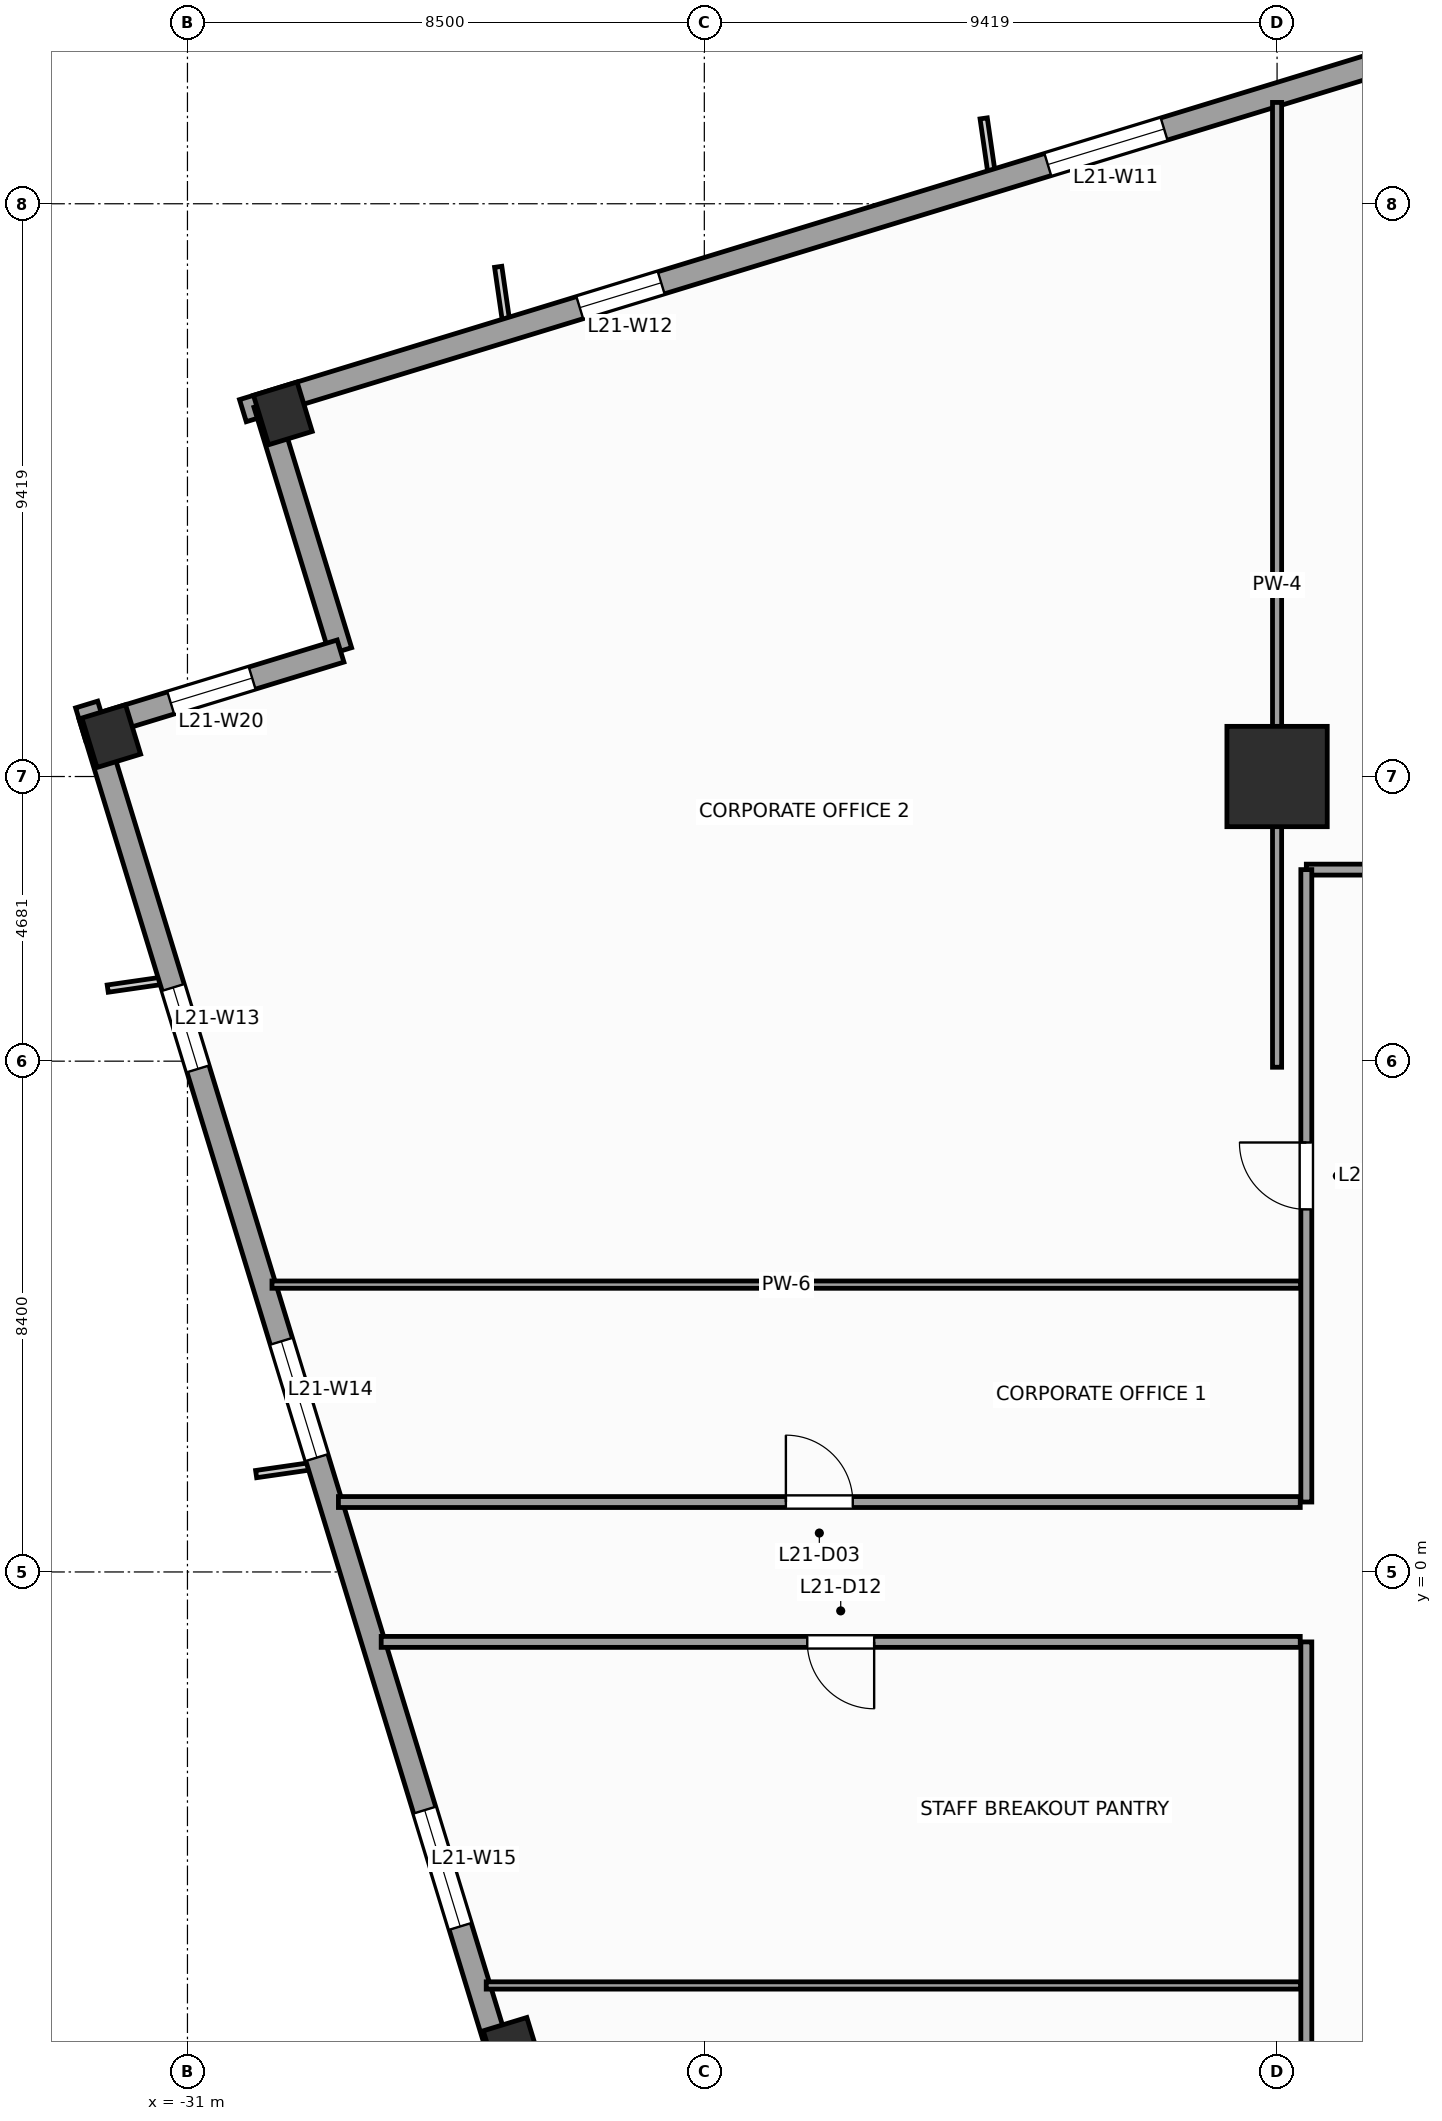
"""IFC4 building model, lengths in metres.
Left out: names, types, materials, properties, quantities, classifications, styles, units other than length and angle.
Written with IfcOpenShell. Run it as: python <this file> out.ifc"""

import sys

from ifc_helpers import new_model, si_unit, direction, frame, frame_2d, origin, origin_2d, place, context, subcontext, project, spatial, rectangle, extrude, source, transform, mapped, element, fill, save


model = new_model("IFC4")
c1 = context("Model", 3, precision=1e-05, world=origin(), true_north=direction((0.0, 1.0)))
c2 = subcontext(c1, "Body", "Model", "MODEL_VIEW")
j1 = project(units=[si_unit("LENGTHUNIT", "METRE"), si_unit("PLANEANGLEUNIT", "RADIAN")], contexts=[c1])
p1 = place(None, origin())
s1 = spatial("IfcSite", under=j1, at=p1, CompositionType="ELEMENT")
p2 = place(p1, origin())
s2 = spatial("IfcBuilding", under=s1, at=p2, CompositionType="ELEMENT")
p3 = place(p2, frame((0.0, 0.0, 91.2)))
s3 = spatial("IfcBuildingStorey", under=s2, at=p3, CompositionType="ELEMENT", Elevation=91.2)
m1 = source(origin(), c2, "Body", "SweptSolid", [
    extrude(rectangle(XDim=1.65, YDim=1.65, at=origin_2d()), origin(), (0.0, 0.0, 1.0), 4.0),
])
p4 = place(p3, frame((-13.081, 13.081, 0.0), z_axis=(0.0, 0.0, 1.0), x_axis=(1.0, 0.0, 0.0)))
e1 = element("IfcColumn", 1, at=p4, inside=s3, PredefinedType="COLUMN", context=c2, shape_type="MappedRepresentation", body=[
    mapped(m1, transform((0.0, 0.0, 0.0), scale=1.0)),
])
m2 = source(origin(), c2, "Body", "SweptSolid", [
    extrude(rectangle(XDim=0.75, YDim=0.85, at=origin_2d()), origin(), (0.0, 0.0, 1.0), 4.0),
])
for number, where, z_axis, x_axis in (
    (2, (-29.431, 19.052, 0.0), (0.0, 0.0, 1.0), (0.956, 0.292, 0.0)),
    (3, (-32.253, 13.746, 0.0), (0.0, 0.0, 1.0), (0.956, 0.292, 0.0)),
    (4, (-25.653, -7.843, 0.0), (0.0, 0.0, 1.0), (0.956, 0.292, 0.0)),
):
    element("IfcColumn", number, at=place(p3, frame(where, z_axis=z_axis, x_axis=x_axis)), inside=s3, PredefinedType="COLUMN", context=c2, shape_type="MappedRepresentation", body=[
        mapped(m2, transform((0.0, 0.0, 0.0), scale=1.0)),
    ])
p5 = place(p3, frame((14.265, 32.658, 0.0), z_axis=(0.0, 0.0, 1.0), x_axis=(-0.956304320851, -0.292373127906, 0.0)))
e5 = element("IfcWall", 5, at=p5, inside=s3, PredefinedType="STANDARD", context=c2, shape_type="SweptSolid", body=[
    extrude(rectangle(XDim=46.38, YDim=0.38, at=frame_2d((23.19, 0.0))), origin(), (0.0, 0.0, 1.0), 3.14),
])
p6 = place(p5, frame((17.065, 0.0, 0.0)))
e6 = element("IfcOpeningElement", 6, at=p6, cuts=e5, PredefinedType="OPENING", context=c2, shape_type="SweptSolid", body=[
    extrude(rectangle(XDim=1.05, YDim=2.25, at=frame_2d((0.525, 1.125))), frame((0.0, 0.2, 0.0), z_axis=(0.0, -1.0, 0.0), x_axis=(1.0, 0.0, 0.0)), (0.0, 0.0, 1.0), 0.4),
])
p7 = place(p5, frame((4.865, 0.0, 0.51)))
e7 = element("IfcOpeningElement", 7, at=p7, cuts=e5, PredefinedType="OPENING", context=c2, shape_type="SweptSolid", body=[
    extrude(rectangle(XDim=1.4, YDim=2.4, at=frame_2d((0.7, 1.2))), frame((0.0, 0.2, 0.0), z_axis=(0.0, -1.0, 0.0), x_axis=(1.0, 0.0, 0.0)), (0.0, 0.0, 1.0), 0.4),
])
p8 = place(p5, frame((12.45, 0.0, 0.51)))
e8 = element("IfcOpeningElement", 8, at=p8, cuts=e5, PredefinedType="OPENING", context=c2, shape_type="SweptSolid", body=[
    extrude(rectangle(XDim=2.0, YDim=2.4, at=frame_2d((1.0, 1.2))), frame((0.0, 0.2, 0.0), z_axis=(0.0, -1.0, 0.0), x_axis=(1.0, 0.0, 0.0)), (0.0, 0.0, 1.0), 0.4),
])
p9 = place(p5, frame((30.538, 0.0, 0.51)))
e9 = element("IfcOpeningElement", 9, at=p9, cuts=e5, PredefinedType="OPENING", context=c2, shape_type="SweptSolid", body=[
    extrude(rectangle(XDim=2.0, YDim=2.4, at=frame_2d((1.0, 1.2))), frame((0.0, 0.2, 0.0), z_axis=(0.0, -1.0, 0.0), x_axis=(1.0, 0.0, 0.0)), (0.0, 0.0, 1.0), 0.4),
])
p10 = place(p5, frame((39.187, 0.0, 0.51)))
e10 = element("IfcOpeningElement", 10, at=p10, cuts=e5, PredefinedType="OPENING", context=c2, shape_type="SweptSolid", body=[
    extrude(rectangle(XDim=1.4, YDim=2.4, at=frame_2d((0.7, 1.2))), frame((0.0, 0.2, 0.0), z_axis=(0.0, -1.0, 0.0), x_axis=(1.0, 0.0, 0.0)), (0.0, 0.0, 1.0), 0.4),
])
p11 = place(p3, frame((-29.725, 19.208, 0.0), z_axis=(0.0, 0.0, 1.0), x_axis=(0.292345507338, -0.956312764915, 0.0)))
e11 = element("IfcWall", 11, at=p11, inside=s3, PredefinedType="STANDARD", context=c2, shape_type="SweptSolid", body=[
    extrude(rectangle(XDim=4.25, YDim=0.38, at=frame_2d((2.125, 0.0))), origin(), (0.0, 0.0, 1.0), 3.74),
])
p12 = place(p3, frame((-28.482, 15.144, 0.0), z_axis=(0.0, 0.0, 1.0), x_axis=(-0.956304176051, -0.292373601522, 0.0)))
e12 = element("IfcWall", 12, at=p12, inside=s3, PredefinedType="STANDARD", context=c2, shape_type="SweptSolid", body=[
    extrude(rectangle(XDim=4.44, YDim=0.38, at=frame_2d((2.22, 0.0))), origin(), (0.0, 0.0, 1.0), 3.04),
])
p13 = place(p12, frame((1.52, 0.0, 0.51)))
e13 = element("IfcOpeningElement", 13, at=p13, cuts=e12, PredefinedType="OPENING", context=c2, shape_type="SweptSolid", body=[
    extrude(rectangle(XDim=1.4, YDim=2.4, at=frame_2d((0.7, 1.2))), frame((0.0, 0.2, 0.0), z_axis=(0.0, -1.0, 0.0), x_axis=(1.0, 0.0, 0.0)), (0.0, 0.0, 1.0), 0.4),
])
p14 = place(p3, frame((-32.658, 14.265, 0.0), z_axis=(0.0, 0.0, 1.0), x_axis=(0.292373127906, -0.956304320851, 0.0)))
e14 = element("IfcWall", 14, at=p14, inside=s3, PredefinedType="STANDARD", context=c2, shape_type="SweptSolid", body=[
    extrude(rectangle(XDim=46.38, YDim=0.38, at=frame_2d((23.19, 0.0))), origin(), (0.0, 0.0, 1.0), 3.14),
])
p15 = place(p14, frame((4.865, 0.0, 0.51)))
e15 = element("IfcOpeningElement", 15, at=p15, cuts=e14, PredefinedType="OPENING", context=c2, shape_type="SweptSolid", body=[
    extrude(rectangle(XDim=1.4, YDim=2.4, at=frame_2d((0.7, 1.2))), frame((0.0, 0.2, 0.0), z_axis=(0.0, -1.0, 0.0), x_axis=(1.0, 0.0, 0.0)), (0.0, 0.0, 1.0), 0.4),
])
p16 = place(p14, frame((10.95, 0.0, 0.51)))
e16 = element("IfcOpeningElement", 16, at=p16, cuts=e14, PredefinedType="OPENING", context=c2, shape_type="SweptSolid", body=[
    extrude(rectangle(XDim=2.0, YDim=2.4, at=frame_2d((1.0, 1.2))), frame((0.0, 0.2, 0.0), z_axis=(0.0, -1.0, 0.0), x_axis=(1.0, 0.0, 0.0)), (0.0, 0.0, 1.0), 0.4),
])
p17 = place(p14, frame((19.012, 0.0, 0.51)))
e17 = element("IfcOpeningElement", 17, at=p17, cuts=e14, PredefinedType="OPENING", context=c2, shape_type="SweptSolid", body=[
    extrude(rectangle(XDim=2.0, YDim=2.4, at=frame_2d((1.0, 1.2))), frame((0.0, 0.2, 0.0), z_axis=(0.0, -1.0, 0.0), x_axis=(1.0, 0.0, 0.0)), (0.0, 0.0, 1.0), 0.4),
])
p18 = place(p14, frame((30.538, 0.0, 0.51)))
e18 = element("IfcOpeningElement", 18, at=p18, cuts=e14, PredefinedType="OPENING", context=c2, shape_type="SweptSolid", body=[
    extrude(rectangle(XDim=2.0, YDim=2.4, at=frame_2d((1.0, 1.2))), frame((0.0, 0.2, 0.0), z_axis=(0.0, -1.0, 0.0), x_axis=(1.0, 0.0, 0.0)), (0.0, 0.0, 1.0), 0.4),
])
p19 = place(p14, frame((39.187, 0.0, 0.51)))
e19 = element("IfcOpeningElement", 19, at=p19, cuts=e14, PredefinedType="OPENING", context=c2, shape_type="SweptSolid", body=[
    extrude(rectangle(XDim=1.4, YDim=2.4, at=frame_2d((0.7, 1.2))), frame((0.0, 0.2, 0.0), z_axis=(0.0, -1.0, 0.0), x_axis=(1.0, 0.0, 0.0)), (0.0, 0.0, 1.0), 0.4),
])
p20 = place(p3, frame((-12.6, 11.55, 0.0), z_axis=(0.0, 0.0, 1.0), x_axis=(1.0, 0.0, 0.0)))
e20 = element("IfcWall", 20, at=p20, inside=s3, PredefinedType="PARTITIONING", context=c2, shape_type="SweptSolid", body=[
    extrude(rectangle(XDim=23.05, YDim=0.18, at=frame_2d((11.525, 0.0))), origin(), (0.0, 0.0, 1.0), 3.74),
])
p21 = place(p20, frame((2.514, 0.0, 0.0)))
e21 = element("IfcOpeningElement", 21, at=p21, cuts=e20, PredefinedType="OPENING", context=c2, shape_type="SweptSolid", body=[
    extrude(rectangle(XDim=1.1, YDim=2.2, at=frame_2d((0.55, 1.1))), frame((0.0, 0.1, 0.0), z_axis=(0.0, -1.0, 0.0), x_axis=(1.0, 0.0, 0.0)), (0.0, 0.0, 1.0), 0.2),
])
p22 = place(p20, frame((8.05, 0.0, 0.0)))
e22 = element("IfcOpeningElement", 22, at=p22, cuts=e20, PredefinedType="OPENING", context=c2, shape_type="SweptSolid", body=[
    extrude(rectangle(XDim=1.1, YDim=2.2, at=frame_2d((0.55, 1.1))), frame((0.0, 0.1, 0.0), z_axis=(0.0, -1.0, 0.0), x_axis=(1.0, 0.0, 0.0)), (0.0, 0.0, 1.0), 0.2),
])
p23 = place(p20, frame((13.65, 0.0, 0.0)))
e23 = element("IfcOpeningElement", 23, at=p23, cuts=e20, PredefinedType="OPENING", context=c2, shape_type="SweptSolid", body=[
    extrude(rectangle(XDim=1.1, YDim=2.2, at=frame_2d((0.55, 1.1))), frame((0.0, 0.1, 0.0), z_axis=(0.0, -1.0, 0.0), x_axis=(1.0, 0.0, 0.0)), (0.0, 0.0, 1.0), 0.2),
])
p24 = place(p20, frame((19.311, 0.0, 0.0)))
e24 = element("IfcOpeningElement", 24, at=p24, cuts=e20, PredefinedType="OPENING", context=c2, shape_type="SweptSolid", body=[
    extrude(rectangle(XDim=1.1, YDim=2.2, at=frame_2d((0.55, 1.1))), frame((0.0, 0.1, 0.0), z_axis=(0.0, -1.0, 0.0), x_axis=(1.0, 0.0, 0.0)), (0.0, 0.0, 1.0), 0.2),
])
p25 = place(p3, frame((-12.6, -12.6, 0.0), z_axis=(0.0, 0.0, 1.0), x_axis=(0.0, 1.0, 0.0)))
e25 = element("IfcWall", 25, at=p25, inside=s3, PredefinedType="PARTITIONING", context=c2, shape_type="SweptSolid", body=[
    extrude(rectangle(XDim=11.45, YDim=0.18, at=frame_2d((5.725, 0.0))), origin(), (0.0, 0.0, 1.0), 3.74),
])
p26 = place(p25, frame((2.514, 0.0, 0.0)))
e26 = element("IfcOpeningElement", 26, at=p26, cuts=e25, PredefinedType="OPENING", context=c2, shape_type="SweptSolid", body=[
    extrude(rectangle(XDim=1.1, YDim=2.2, at=frame_2d((0.55, 1.1))), frame((0.0, 0.1, 0.0), z_axis=(0.0, -1.0, 0.0), x_axis=(1.0, 0.0, 0.0)), (0.0, 0.0, 1.0), 0.2),
])
p27 = place(p3, frame((-12.6, 1.15, 0.0), z_axis=(0.0, 0.0, 1.0), x_axis=(0.0, 1.0, 0.0)))
e27 = element("IfcWall", 27, at=p27, inside=s3, PredefinedType="PARTITIONING", context=c2, shape_type="SweptSolid", body=[
    extrude(rectangle(XDim=10.4, YDim=0.18, at=frame_2d((5.2, 0.0))), origin(), (0.0, 0.0, 1.0), 3.74),
])
p28 = place(p27, frame((4.812, 0.0, 0.0)))
e28 = element("IfcOpeningElement", 28, at=p28, cuts=e27, PredefinedType="OPENING", context=c2, shape_type="SweptSolid", body=[
    extrude(rectangle(XDim=1.1, YDim=2.2, at=frame_2d((0.55, 1.1))), frame((0.0, 0.1, 0.0), z_axis=(0.0, -1.0, 0.0), x_axis=(1.0, 0.0, 0.0)), (0.0, 0.0, 1.0), 0.2),
])
p29 = place(p3, frame((-27.814, -1.15, 0.0), z_axis=(0.0, 0.0, 1.0), x_axis=(1.0, 0.0, 0.0)))
e29 = element("IfcWall", 29, at=p29, inside=s3, PredefinedType="PARTITIONING", context=c2, shape_type="SweptSolid", body=[
    extrude(rectangle(XDim=15.114, YDim=0.18, at=frame_2d((7.557, 0.0))), origin(), (0.0, 0.0, 1.0), 3.74),
])
p30 = place(p29, frame((7.007, 0.0, 0.0)))
e30 = element("IfcOpeningElement", 30, at=p30, cuts=e29, PredefinedType="OPENING", context=c2, shape_type="SweptSolid", body=[
    extrude(rectangle(XDim=1.1, YDim=2.2, at=frame_2d((0.55, 1.1))), frame((0.0, 0.1, 0.0), z_axis=(0.0, -1.0, 0.0), x_axis=(1.0, 0.0, 0.0)), (0.0, 0.0, 1.0), 0.2),
])
p31 = place(p3, frame((-28.517, 1.15, 0.0), z_axis=(0.0, 0.0, 1.0), x_axis=(1.0, 0.0, 0.0)))
e31 = element("IfcWall", 31, at=p31, inside=s3, PredefinedType="PARTITIONING", context=c2, shape_type="SweptSolid", body=[
    extrude(rectangle(XDim=15.817, YDim=0.18, at=frame_2d((7.909, 0.0))), origin(), (0.0, 0.0, 1.0), 3.74),
])
p32 = place(p31, frame((7.359, 0.0, 0.0)))
e32 = element("IfcOpeningElement", 32, at=p32, cuts=e31, PredefinedType="OPENING", context=c2, shape_type="SweptSolid", body=[
    extrude(rectangle(XDim=1.1, YDim=2.2, at=frame_2d((0.55, 1.1))), frame((0.0, 0.1, 0.0), z_axis=(0.0, -1.0, 0.0), x_axis=(1.0, 0.0, 0.0)), (0.0, 0.0, 1.0), 0.2),
])
p33 = place(p3, frame((-13.081, 8.3, 0.0), z_axis=(0.0, 0.0, 1.0), x_axis=(0.0, 1.0, 0.0)))
e33 = element("IfcWall", 33, at=p33, inside=s3, PredefinedType="PARTITIONING", context=c2, shape_type="SweptSolid", body=[
    extrude(rectangle(XDim=15.866, YDim=0.15, at=frame_2d((7.933, 0.0))), origin(), (0.0, 0.0, 1.0), 2.732),
])
p34 = place(p3, frame((-29.61, 4.725, 0.0), z_axis=(0.0, 0.0, 1.0), x_axis=(1.0, 0.0, 0.0)))
e34 = element("IfcWall", 34, at=p34, inside=s3, PredefinedType="PARTITIONING", context=c2, shape_type="SweptSolid", body=[
    extrude(rectangle(XDim=16.915, YDim=0.12, at=frame_2d((8.458, 0.0))), origin(), (0.0, 0.0, 1.0), 3.74),
])
p35 = place(p3, frame((-26.087, -6.8, 0.0), z_axis=(0.0, 0.0, 1.0), x_axis=(1.0, 0.0, 0.0)))
e35 = element("IfcWall", 35, at=p35, inside=s3, PredefinedType="PARTITIONING", context=c2, shape_type="SweptSolid", body=[
    extrude(rectangle(XDim=13.392, YDim=0.12, at=frame_2d((6.696, 0.0))), origin(), (0.0, 0.0, 1.0), 3.74),
])
m3 = source(origin(), c2, "Body", "SweptSolid", [
    extrude(rectangle(XDim=2.0, YDim=2.4, at=frame_2d((1.0, 1.2))), frame((0.0, 0.03, 0.0), z_axis=(0.0, -1.0, 0.0), x_axis=(1.0, 0.0, 0.0)), (0.0, 0.0, 1.0), 0.06),
])
p36 = place(p9, origin())
e36 = element("IfcWindow", 36, at=p36, inside=s3, PartitioningType="SINGLE_PANEL", PredefinedType="WINDOW", context=c2, shape_type="MappedRepresentation", body=[
    mapped(m3, transform((0.0, 0.0, 0.0), scale=1.0)),
])
fill(e9, e36)
m4 = source(origin(), c2, "Body", "SweptSolid", [
    extrude(rectangle(XDim=1.4, YDim=2.4, at=frame_2d((0.7, 1.2))), frame((0.0, 0.03, 0.0), z_axis=(0.0, -1.0, 0.0), x_axis=(1.0, 0.0, 0.0)), (0.0, 0.0, 1.0), 0.06),
])
p37 = place(p10, origin())
e37 = element("IfcWindow", 37, at=p37, inside=s3, PartitioningType="SINGLE_PANEL", PredefinedType="WINDOW", context=c2, shape_type="MappedRepresentation", body=[
    mapped(m4, transform((0.0, 0.0, 0.0), scale=1.0)),
])
fill(e10, e37)
p38 = place(p15, origin())
e38 = element("IfcWindow", 38, at=p38, inside=s3, PartitioningType="SINGLE_PANEL", PredefinedType="WINDOW", context=c2, shape_type="MappedRepresentation", body=[
    mapped(m4, transform((0.0, 0.0, 0.0), scale=1.0)),
])
fill(e15, e38)
p39 = place(p16, origin())
e39 = element("IfcWindow", 39, at=p39, inside=s3, PartitioningType="SINGLE_PANEL", PredefinedType="WINDOW", context=c2, shape_type="MappedRepresentation", body=[
    mapped(m3, transform((0.0, 0.0, 0.0), scale=1.0)),
])
fill(e16, e39)
p40 = place(p17, origin())
e40 = element("IfcWindow", 40, at=p40, inside=s3, PartitioningType="SINGLE_PANEL", PredefinedType="WINDOW", context=c2, shape_type="MappedRepresentation", body=[
    mapped(m3, transform((0.0, 0.0, 0.0), scale=1.0)),
])
fill(e17, e40)
p41 = place(p13, origin())
e41 = element("IfcWindow", 41, at=p41, inside=s3, PartitioningType="SINGLE_PANEL", PredefinedType="WINDOW", context=c2, shape_type="MappedRepresentation", body=[
    mapped(m4, transform((0.0, 0.0, 0.0), scale=1.0)),
])
fill(e13, e41)
m5 = source(origin(), c2, "Body", "SweptSolid", [
    extrude(rectangle(XDim=1.1, YDim=2.2, at=frame_2d((0.55, 1.1))), frame((0.0, 0.025, 0.0), z_axis=(0.0, -1.0, 0.0), x_axis=(1.0, 0.0, 0.0)), (0.0, 0.0, 1.0), 0.05),
])
p42 = place(p32, origin())
e42 = element("IfcDoor", 42, at=p42, inside=s3, OperationType="SINGLE_SWING_LEFT", PredefinedType="DOOR", context=c2, shape_type="MappedRepresentation", body=[
    mapped(m5, transform((0.0, 0.0, 0.0), scale=1.0)),
])
fill(e32, e42)
p43 = place(p28, origin())
e43 = element("IfcDoor", 43, at=p43, inside=s3, OperationType="SINGLE_SWING_RIGHT", PredefinedType="DOOR", context=c2, shape_type="MappedRepresentation", body=[
    mapped(m5, transform((0.0, 0.0, 0.0), scale=1.0)),
])
fill(e28, e43)
p44 = place(p30, frame((1.1, 0.0, 0.0), z_axis=(0.0, 0.0, 1.0), x_axis=(-1.0, 0.0, 0.0)))
e44 = element("IfcDoor", 44, at=p44, inside=s3, OperationType="SINGLE_SWING_RIGHT", PredefinedType="DOOR", context=c2, shape_type="MappedRepresentation", body=[
    mapped(m5, transform((0.0, 0.0, 0.0), scale=1.0)),
])
fill(e30, e44)
save(model, sys.argv[1])
